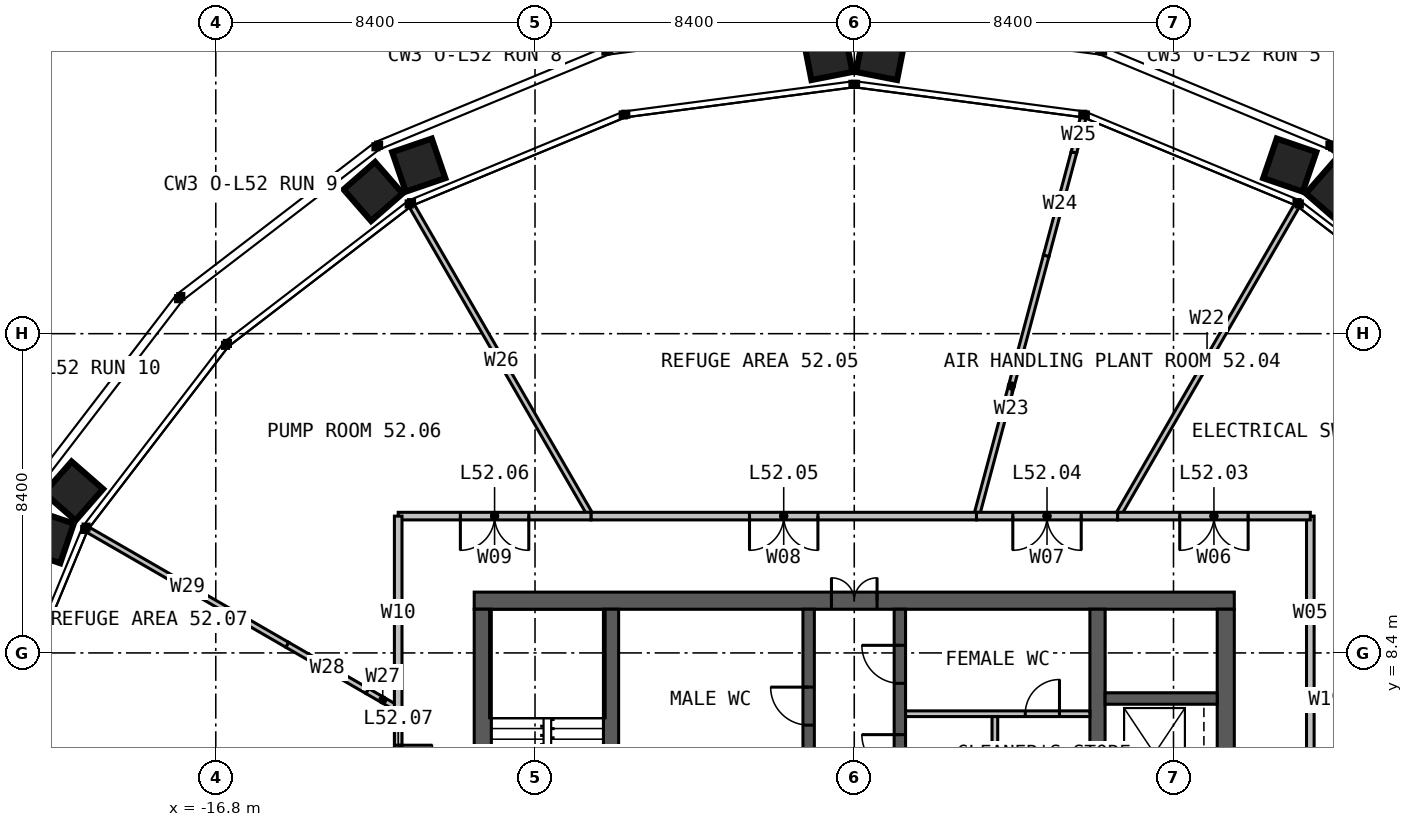
"""IFC4 building model, lengths in metres.
Left out: names, types, materials, properties, quantities, classifications, styles, units other than length and angle.
Written with IfcOpenShell. Run it as: python <this file> out.ifc"""

import sys

from ifc_helpers import new_model, si_unit, direction, frame, frame_2d, origin, place, context, subcontext, project, spatial, rectangle, extrude, element, fill, save


model = new_model("IFC4")
c1 = context("Model", 3, precision=1e-05, world=origin(), true_north=direction((0.0, 1.0)))
c2 = subcontext(c1, "Body", "Model", "MODEL_VIEW")
j1 = project(units=[si_unit("LENGTHUNIT", "METRE"), si_unit("PLANEANGLEUNIT", "RADIAN")], contexts=[c1])
p1 = place(None, origin())
s1 = spatial("IfcSite", under=j1, at=p1, CompositionType="ELEMENT")
p2 = place(p1, origin())
s2 = spatial("IfcBuilding", under=s1, at=p2, CompositionType="ELEMENT")
p3 = place(p2, frame((0.0, 0.0, 215.0)))
s3 = spatial("IfcBuildingStorey", under=s2, at=p3, CompositionType="ELEMENT", Elevation=215.0)
p4 = place(p3, frame((-10.0, 9.775, 0.0), z_axis=(0.0, 0.0, 1.0), x_axis=(1.0, 0.0, 0.0)))
e1 = element("IfcWall", 1, at=p4, inside=s3, PredefinedType="SOLIDWALL", context=c2, shape_type="SweptSolid", body=[
    extrude(rectangle(XDim=20.0, YDim=0.45, at=frame_2d((10.0, 0.0))), origin(), (0.0, 0.0, 1.0), 5.0),
])
p5 = place(p4, frame((9.4, 0.0, 0.0)))
e2 = element("IfcOpeningElement", 2, at=p5, cuts=e1, PredefinedType="OPENING", context=c2, shape_type="SweptSolid", body=[
    extrude(rectangle(XDim=1.2, YDim=2.2, at=frame_2d((0.6, 1.1))), frame((0.0, 0.235, 0.0), z_axis=(0.0, -1.0, 0.0), x_axis=(1.0, 0.0, 0.0)), (0.0, 0.0, 1.0), 0.47),
])
for number, where, z_axis, x_axis in (
    (3, (9.775, -9.55, 0.0), (0.0, 0.0, 1.0), (0.0, 1.0, 0.0)),
    (4, (-9.775, 9.55, 0.0), (0.0, 0.0, 1.0), (0.0, -1.0, 0.0)),
):
    element("IfcWall", number, at=place(p3, frame(where, z_axis=z_axis, x_axis=x_axis)), inside=s3, PredefinedType="SOLIDWALL", context=c2, shape_type="SweptSolid", body=[
        extrude(rectangle(XDim=19.1, YDim=0.45, at=frame_2d((9.55, 0.0))), origin(), (0.0, 0.0, 1.0), 5.0),
    ])
p6 = place(p3, frame((-6.4, -9.55, 0.0), z_axis=(0.0, 0.0, 1.0), x_axis=(0.0, 1.0, 0.0)))
e5 = element("IfcWall", 5, at=p6, inside=s3, PredefinedType="SOLIDWALL", context=c2, shape_type="SweptSolid", body=[
    extrude(rectangle(XDim=19.1, YDim=0.4, at=frame_2d((9.55, 0.0))), origin(), (0.0, 0.0, 1.0), 5.0),
])
p7 = place(p6, frame((9.05, 0.0, 0.0)))
e6 = element("IfcOpeningElement", 6, at=p7, cuts=e5, PredefinedType="OPENING", context=c2, shape_type="SweptSolid", body=[
    extrude(rectangle(XDim=1.0, YDim=2.2, at=frame_2d((0.5, 1.1))), frame((0.0, 0.21, 0.0), z_axis=(0.0, -1.0, 0.0), x_axis=(1.0, 0.0, 0.0)), (0.0, 0.0, 1.0), 0.42),
])
p8 = place(p3, frame((6.4, 9.55, 0.0), z_axis=(0.0, 0.0, 1.0), x_axis=(0.0, -1.0, 0.0)))
e7 = element("IfcWall", 7, at=p8, inside=s3, PredefinedType="SOLIDWALL", context=c2, shape_type="SweptSolid", body=[
    extrude(rectangle(XDim=19.1, YDim=0.4, at=frame_2d((9.55, 0.0))), origin(), (0.0, 0.0, 1.0), 5.0),
])
p9 = place(p8, frame((9.05, 0.0, 0.0)))
e8 = element("IfcOpeningElement", 8, at=p9, cuts=e7, PredefinedType="OPENING", context=c2, shape_type="SweptSolid", body=[
    extrude(rectangle(XDim=1.0, YDim=2.2, at=frame_2d((0.5, 1.1))), frame((0.0, 0.21, 0.0), z_axis=(0.0, -1.0, 0.0), x_axis=(1.0, 0.0, 0.0)), (0.0, 0.0, 1.0), 0.42),
])
p10 = place(p3, frame((-1.2, 1.45, 0.0), z_axis=(0.0, 0.0, 1.0), x_axis=(0.0, 1.0, 0.0)))
e9 = element("IfcWall", 9, at=p10, inside=s3, PredefinedType="SOLIDWALL", context=c2, shape_type="SweptSolid", body=[
    extrude(rectangle(XDim=8.1, YDim=0.3, at=frame_2d((4.05, 0.0))), origin(), (0.0, 0.0, 1.0), 5.0),
])
p11 = place(p10, frame((5.05, 0.0, 0.0)))
e10 = element("IfcOpeningElement", 10, at=p11, cuts=e9, PredefinedType="OPENING", context=c2, shape_type="SweptSolid", body=[
    extrude(rectangle(XDim=1.0, YDim=2.2, at=frame_2d((0.5, 1.1))), frame((0.0, 0.16, 0.0), z_axis=(0.0, -1.0, 0.0), x_axis=(1.0, 0.0, 0.0)), (0.0, 0.0, 1.0), 0.32),
])
p12 = place(p3, frame((1.2, 1.45, 0.0), z_axis=(0.0, 0.0, 1.0), x_axis=(0.0, 1.0, 0.0)))
e11 = element("IfcWall", 11, at=p12, inside=s3, PredefinedType="SOLIDWALL", context=c2, shape_type="SweptSolid", body=[
    extrude(rectangle(XDim=8.1, YDim=0.3, at=frame_2d((4.05, 0.0))), origin(), (0.0, 0.0, 1.0), 5.0),
])
p13 = place(p12, frame((3.8, 0.0, 0.0)))
e12 = element("IfcOpeningElement", 12, at=p13, cuts=e11, PredefinedType="OPENING", context=c2, shape_type="SweptSolid", body=[
    extrude(rectangle(XDim=1.0, YDim=2.2, at=frame_2d((0.5, 1.1))), frame((0.0, 0.16, 0.0), z_axis=(0.0, -1.0, 0.0), x_axis=(1.0, 0.0, 0.0)), (0.0, 0.0, 1.0), 0.32),
])
p14 = place(p12, frame((6.15, 0.0, 0.0)))
e13 = element("IfcOpeningElement", 13, at=p14, cuts=e11, PredefinedType="OPENING", context=c2, shape_type="SweptSolid", body=[
    extrude(rectangle(XDim=1.0, YDim=2.2, at=frame_2d((0.5, 1.1))), frame((0.0, 0.16, 0.0), z_axis=(0.0, -1.0, 0.0), x_axis=(1.0, 0.0, 0.0)), (0.0, 0.0, 1.0), 0.32),
])
p15 = place(p3, frame((6.6, 7.2, 0.0), z_axis=(0.0, 0.0, 1.0), x_axis=(1.0, 0.0, 0.0)))
e14 = element("IfcWall", 14, at=p15, inside=s3, PredefinedType="SOLIDWALL", context=c2, shape_type="SweptSolid", body=[
    extrude(rectangle(XDim=2.95, YDim=0.3, at=frame_2d((1.475, 0.0))), origin(), (0.0, 0.0, 1.0), 5.0),
])
p16 = place(p3, frame((1.35, 6.8, 0.0), z_axis=(0.0, 0.0, 1.0), x_axis=(1.0, 0.0, 0.0)))
e15 = element("IfcWall", 15, at=p16, inside=s3, PredefinedType="PARTITIONING", context=c2, shape_type="SweptSolid", body=[
    extrude(rectangle(XDim=4.85, YDim=0.15, at=frame_2d((2.425, 0.0))), origin(), (0.0, 0.0, 1.0), 4.75),
])
p17 = place(p16, frame((3.15, 0.0, 0.0)))
e16 = element("IfcOpeningElement", 16, at=p17, cuts=e15, PredefinedType="OPENING", context=c2, shape_type="SweptSolid", body=[
    extrude(rectangle(XDim=0.9, YDim=2.2, at=frame_2d((0.45, 1.1))), frame((0.0, 0.085, 0.0), z_axis=(0.0, -1.0, 0.0), x_axis=(1.0, 0.0, 0.0)), (0.0, 0.0, 1.0), 0.17),
])
p18 = place(p3, frame((3.7, 4.75, 0.0), z_axis=(0.0, 0.0, 1.0), x_axis=(0.0, 1.0, 0.0)))
e17 = element("IfcWall", 17, at=p18, inside=s3, PredefinedType="PARTITIONING", context=c2, shape_type="SweptSolid", body=[
    extrude(rectangle(XDim=1.975, YDim=0.15, at=frame_2d((0.988, 0.0))), origin(), (0.0, 0.0, 1.0), 4.75),
])
p19 = place(p3, frame((12.0, 6.928, 0.0), z_axis=(0.0, 0.0, 1.0), x_axis=(0.866042712228, 0.499970019698, 0.0)))
e18 = element("IfcWall", 18, at=p19, inside=s3, PredefinedType="PARTITIONING", context=c2, shape_type="SweptSolid", body=[
    extrude(rectangle(XDim=0.939, YDim=0.15, at=frame_2d((0.469, 0.0))), origin(), (0.0, 0.0, 1.0), 4.8),
])
p20 = place(p3, frame((6.928, 12.0, 0.0), z_axis=(0.0, 0.0, 1.0), x_axis=(0.500008934908, 0.866020245151, 0.0)))
e19 = element("IfcWall", 19, at=p20, inside=s3, PredefinedType="PARTITIONING", context=c2, shape_type="SweptSolid", body=[
    extrude(rectangle(XDim=9.418, YDim=0.15, at=frame_2d((4.709, 0.0))), origin(), (0.0, 0.0, 1.0), 4.8),
])
p21 = place(p3, frame((3.215, 12.0, 0.0), z_axis=(0.0, 0.0, 1.0), x_axis=(0.258845050614, 0.965918857758, 0.0)))
e20 = element("IfcWall", 20, at=p21, inside=s3, PredefinedType="PARTITIONING", context=c2, shape_type="SweptSolid", body=[
    extrude(rectangle(XDim=7.093, YDim=0.15, at=frame_2d((3.546, 0.0))), origin(), (0.0, 0.0, 1.0), 4.8),
])
p22 = place(p3, frame((5.051, 18.851, 0.0), z_axis=(0.0, 0.0, 1.0), x_axis=(0.258741864149, 0.965946503558, 0.0)))
e21 = element("IfcWall", 21, at=p22, inside=s3, PredefinedType="PARTITIONING", context=c2, shape_type="SweptSolid", body=[
    extrude(rectangle(XDim=2.816, YDim=0.15, at=frame_2d((1.408, 0.0))), origin(), (0.0, 0.0, 1.0), 3.79),
])
p23 = place(p3, frame((5.78, 21.571, 0.0), z_axis=(0.0, 0.0, 1.0), x_axis=(0.259016592134, 0.965872872069, 0.0)))
e22 = element("IfcWall", 22, at=p23, inside=s3, PredefinedType="PARTITIONING", context=c2, shape_type="SweptSolid", body=[
    extrude(rectangle(XDim=0.943, YDim=0.15, at=frame_2d((0.471, 0.0))), origin(), (0.0, 0.0, 1.0), 4.8),
])
p24 = place(p3, frame((-6.928, 12.0, 0.0), z_axis=(0.0, 0.0, 1.0), x_axis=(-0.500008934908, 0.866020245151, 0.0)))
e23 = element("IfcWall", 23, at=p24, inside=s3, PredefinedType="PARTITIONING", context=c2, shape_type="SweptSolid", body=[
    extrude(rectangle(XDim=9.418, YDim=0.15, at=frame_2d((4.709, 0.0))), origin(), (0.0, 0.0, 1.0), 4.8),
])
p25 = place(p3, frame((-12.0, 6.928, 0.0), z_axis=(0.0, 0.0, 1.0), x_axis=(-0.866042712228, 0.499970019698, 0.0)))
e24 = element("IfcWall", 24, at=p25, inside=s3, PredefinedType="PARTITIONING", context=c2, shape_type="SweptSolid", body=[
    extrude(rectangle(XDim=0.939, YDim=0.15, at=frame_2d((0.469, 0.0))), origin(), (0.0, 0.0, 1.0), 4.8),
])
p26 = place(p3, frame((-12.813, 7.398, 0.0), z_axis=(0.0, 0.0, 1.0), x_axis=(-0.86601855109, 0.500011869027, 0.0)))
e25 = element("IfcWall", 25, at=p26, inside=s3, PredefinedType="PARTITIONING", context=c2, shape_type="SweptSolid", body=[
    extrude(rectangle(XDim=2.434, YDim=0.15, at=frame_2d((1.217, 0.0))), origin(), (0.0, 0.0, 1.0), 3.79),
])
p27 = place(p3, frame((-14.921, 8.615, 0.0), z_axis=(0.0, 0.0, 1.0), x_axis=(-0.866017437, 0.500013798622, 0.0)))
e26 = element("IfcWall", 26, at=p27, inside=s3, PredefinedType="PARTITIONING", context=c2, shape_type="SweptSolid", body=[
    extrude(rectangle(XDim=6.045, YDim=0.15, at=frame_2d((3.022, 0.0))), origin(), (0.0, 0.0, 1.0), 4.8),
])
p28 = place(p3, frame((12.0, -3.215, 0.0), z_axis=(0.0, 0.0, 1.0), x_axis=(0.0, 1.0, 0.0)))
e27 = element("IfcWall", 27, at=p28, inside=s3, PredefinedType="PARTITIONING", context=c2, shape_type="SweptSolid", body=[
    extrude(rectangle(XDim=10.144, YDim=0.2, at=frame_2d((5.072, 0.0))), origin(), (0.0, 0.0, 1.0), 4.8),
])
p29 = place(p28, frame((4.172, 0.0, 0.0)))
e28 = element("IfcOpeningElement", 28, at=p29, cuts=e27, PredefinedType="OPENING", context=c2, shape_type="SweptSolid", body=[
    extrude(rectangle(XDim=1.8, YDim=2.2, at=frame_2d((0.9, 1.1))), frame((0.0, 0.11, 0.0), z_axis=(0.0, -1.0, 0.0), x_axis=(1.0, 0.0, 0.0)), (0.0, 0.0, 1.0), 0.22),
])
p30 = place(p3, frame((12.0, 6.928, 0.0), z_axis=(0.0, 0.0, 1.0), x_axis=(0.0, 1.0, 0.0)))
e29 = element("IfcWall", 29, at=p30, inside=s3, PredefinedType="PARTITIONING", context=c2, shape_type="SweptSolid", body=[
    extrude(rectangle(XDim=5.072, YDim=0.2, at=frame_2d((2.536, 0.0))), origin(), (0.0, 0.0, 1.0), 4.8),
])
p31 = place(p3, frame((12.0, 12.0, 0.0), z_axis=(0.0, 0.0, 1.0), x_axis=(-1.0, 0.0, 0.0)))
e30 = element("IfcWall", 30, at=p31, inside=s3, PredefinedType="PARTITIONING", context=c2, shape_type="SweptSolid", body=[
    extrude(rectangle(XDim=5.072, YDim=0.2, at=frame_2d((2.536, 0.0))), origin(), (0.0, 0.0, 1.0), 4.8),
])
p32 = place(p31, frame((1.636, 0.0, 0.0)))
e31 = element("IfcOpeningElement", 31, at=p32, cuts=e30, PredefinedType="OPENING", context=c2, shape_type="SweptSolid", body=[
    extrude(rectangle(XDim=1.8, YDim=2.2, at=frame_2d((0.9, 1.1))), frame((0.0, 0.11, 0.0), z_axis=(0.0, -1.0, 0.0), x_axis=(1.0, 0.0, 0.0)), (0.0, 0.0, 1.0), 0.22),
])
p33 = place(p3, frame((6.928, 12.0, 0.0), z_axis=(0.0, 0.0, 1.0), x_axis=(-1.0, 0.0, 0.0)))
e32 = element("IfcWall", 32, at=p33, inside=s3, PredefinedType="PARTITIONING", context=c2, shape_type="SweptSolid", body=[
    extrude(rectangle(XDim=3.713, YDim=0.2, at=frame_2d((1.856, 0.0))), origin(), (0.0, 0.0, 1.0), 4.8),
])
p34 = place(p33, frame((0.956, 0.0, 0.0)))
e33 = element("IfcOpeningElement", 33, at=p34, cuts=e32, PredefinedType="OPENING", context=c2, shape_type="SweptSolid", body=[
    extrude(rectangle(XDim=1.8, YDim=2.2, at=frame_2d((0.9, 1.1))), frame((0.0, 0.11, 0.0), z_axis=(0.0, -1.0, 0.0), x_axis=(1.0, 0.0, 0.0)), (0.0, 0.0, 1.0), 0.22),
])
p35 = place(p3, frame((3.215, 12.0, 0.0), z_axis=(0.0, 0.0, 1.0), x_axis=(-1.0, 0.0, 0.0)))
e34 = element("IfcWall", 34, at=p35, inside=s3, PredefinedType="PARTITIONING", context=c2, shape_type="SweptSolid", body=[
    extrude(rectangle(XDim=10.144, YDim=0.2, at=frame_2d((5.072, 0.0))), origin(), (0.0, 0.0, 1.0), 4.8),
])
p36 = place(p35, frame((4.172, 0.0, 0.0)))
e35 = element("IfcOpeningElement", 35, at=p36, cuts=e34, PredefinedType="OPENING", context=c2, shape_type="SweptSolid", body=[
    extrude(rectangle(XDim=1.8, YDim=2.2, at=frame_2d((0.9, 1.1))), frame((0.0, 0.11, 0.0), z_axis=(0.0, -1.0, 0.0), x_axis=(1.0, 0.0, 0.0)), (0.0, 0.0, 1.0), 0.22),
])
p37 = place(p3, frame((-6.928, 12.0, 0.0), z_axis=(0.0, 0.0, 1.0), x_axis=(-1.0, 0.0, 0.0)))
e36 = element("IfcWall", 36, at=p37, inside=s3, PredefinedType="PARTITIONING", context=c2, shape_type="SweptSolid", body=[
    extrude(rectangle(XDim=5.072, YDim=0.2, at=frame_2d((2.536, 0.0))), origin(), (0.0, 0.0, 1.0), 4.8),
])
p38 = place(p37, frame((1.636, 0.0, 0.0)))
e37 = element("IfcOpeningElement", 37, at=p38, cuts=e36, PredefinedType="OPENING", context=c2, shape_type="SweptSolid", body=[
    extrude(rectangle(XDim=1.8, YDim=2.2, at=frame_2d((0.9, 1.1))), frame((0.0, 0.11, 0.0), z_axis=(0.0, -1.0, 0.0), x_axis=(1.0, 0.0, 0.0)), (0.0, 0.0, 1.0), 0.22),
])
p39 = place(p3, frame((-12.0, 12.0, 0.0), z_axis=(0.0, 0.0, 1.0), x_axis=(0.0, -1.0, 0.0)))
e38 = element("IfcWall", 38, at=p39, inside=s3, PredefinedType="PARTITIONING", context=c2, shape_type="SweptSolid", body=[
    extrude(rectangle(XDim=5.072, YDim=0.2, at=frame_2d((2.536, 0.0))), origin(), (0.0, 0.0, 1.0), 4.8),
])
p40 = place(p3, frame((-12.0, 6.928, 0.0), z_axis=(0.0, 0.0, 1.0), x_axis=(0.0, -1.0, 0.0)))
e39 = element("IfcWall", 39, at=p40, inside=s3, PredefinedType="PARTITIONING", context=c2, shape_type="SweptSolid", body=[
    extrude(rectangle(XDim=3.713, YDim=0.2, at=frame_2d((1.856, 0.0))), origin(), (0.0, 0.0, 1.0), 4.8),
])
p41 = place(p40, frame((0.956, 0.0, 0.0)))
e40 = element("IfcOpeningElement", 40, at=p41, cuts=e39, PredefinedType="OPENING", context=c2, shape_type="SweptSolid", body=[
    extrude(rectangle(XDim=1.8, YDim=2.2, at=frame_2d((0.9, 1.1))), frame((0.0, 0.11, 0.0), z_axis=(0.0, -1.0, 0.0), x_axis=(1.0, 0.0, 0.0)), (0.0, 0.0, 1.0), 0.22),
])
p42 = place(p5, origin())
e41 = element("IfcDoor", 41, at=p42, inside=s3, OperationType="DOUBLE_DOOR_SINGLE_SWING", PredefinedType="DOOR", context=c2, shape_type="SweptSolid", body=[
    extrude(rectangle(XDim=1.2, YDim=2.2, at=frame_2d((0.6, 1.1))), frame((0.0, 0.025, 0.0), z_axis=(0.0, -1.0, 0.0), x_axis=(1.0, 0.0, 0.0)), (0.0, 0.0, 1.0), 0.05),
])
fill(e2, e41)
p43 = place(p11, origin())
e42 = element("IfcDoor", 42, at=p43, inside=s3, OperationType="SINGLE_SWING_RIGHT", PredefinedType="DOOR", context=c2, shape_type="SweptSolid", body=[
    extrude(rectangle(XDim=1.0, YDim=2.2, at=frame_2d((0.5, 1.1))), frame((0.0, 0.025, 0.0), z_axis=(0.0, -1.0, 0.0), x_axis=(1.0, 0.0, 0.0)), (0.0, 0.0, 1.0), 0.05),
])
fill(e10, e42)
p44 = place(p13, origin())
e43 = element("IfcDoor", 43, at=p44, inside=s3, OperationType="SINGLE_SWING_RIGHT", PredefinedType="DOOR", context=c2, shape_type="SweptSolid", body=[
    extrude(rectangle(XDim=1.0, YDim=2.2, at=frame_2d((0.5, 1.1))), frame((0.0, 0.025, 0.0), z_axis=(0.0, -1.0, 0.0), x_axis=(1.0, 0.0, 0.0)), (0.0, 0.0, 1.0), 0.05),
])
fill(e12, e43)
p45 = place(p14, origin())
e44 = element("IfcDoor", 44, at=p45, inside=s3, OperationType="SINGLE_SWING_RIGHT", PredefinedType="DOOR", context=c2, shape_type="SweptSolid", body=[
    extrude(rectangle(XDim=1.0, YDim=2.2, at=frame_2d((0.5, 1.1))), frame((0.0, 0.025, 0.0), z_axis=(0.0, -1.0, 0.0), x_axis=(1.0, 0.0, 0.0)), (0.0, 0.0, 1.0), 0.05),
])
fill(e13, e44)
p46 = place(p17, origin())
e45 = element("IfcDoor", 45, at=p46, inside=s3, OperationType="SINGLE_SWING_RIGHT", PredefinedType="DOOR", context=c2, shape_type="SweptSolid", body=[
    extrude(rectangle(XDim=0.9, YDim=2.2, at=frame_2d((0.45, 1.1))), frame((0.0, 0.025, 0.0), z_axis=(0.0, -1.0, 0.0), x_axis=(1.0, 0.0, 0.0)), (0.0, 0.0, 1.0), 0.05),
])
fill(e16, e45)
p47 = place(p32, origin())
e46 = element("IfcDoor", 46, at=p47, inside=s3, OperationType="DOUBLE_DOOR_SINGLE_SWING", PredefinedType="DOOR", context=c2, shape_type="SweptSolid", body=[
    extrude(rectangle(XDim=1.8, YDim=2.2, at=frame_2d((0.9, 1.1))), frame((0.0, 0.025, 0.0), z_axis=(0.0, -1.0, 0.0), x_axis=(1.0, 0.0, 0.0)), (0.0, 0.0, 1.0), 0.05),
])
fill(e31, e46)
p48 = place(p34, origin())
e47 = element("IfcDoor", 47, at=p48, inside=s3, OperationType="DOUBLE_DOOR_SINGLE_SWING", PredefinedType="DOOR", context=c2, shape_type="SweptSolid", body=[
    extrude(rectangle(XDim=1.8, YDim=2.2, at=frame_2d((0.9, 1.1))), frame((0.0, 0.025, 0.0), z_axis=(0.0, -1.0, 0.0), x_axis=(1.0, 0.0, 0.0)), (0.0, 0.0, 1.0), 0.05),
])
fill(e33, e47)
p49 = place(p36, origin())
e48 = element("IfcDoor", 48, at=p49, inside=s3, OperationType="DOUBLE_DOOR_SINGLE_SWING", PredefinedType="DOOR", context=c2, shape_type="SweptSolid", body=[
    extrude(rectangle(XDim=1.8, YDim=2.2, at=frame_2d((0.9, 1.1))), frame((0.0, 0.025, 0.0), z_axis=(0.0, -1.0, 0.0), x_axis=(1.0, 0.0, 0.0)), (0.0, 0.0, 1.0), 0.05),
])
fill(e35, e48)
p50 = place(p38, origin())
e49 = element("IfcDoor", 49, at=p50, inside=s3, OperationType="DOUBLE_DOOR_SINGLE_SWING", PredefinedType="DOOR", context=c2, shape_type="SweptSolid", body=[
    extrude(rectangle(XDim=1.8, YDim=2.2, at=frame_2d((0.9, 1.1))), frame((0.0, 0.025, 0.0), z_axis=(0.0, -1.0, 0.0), x_axis=(1.0, 0.0, 0.0)), (0.0, 0.0, 1.0), 0.05),
])
fill(e37, e49)
p51 = place(p41, origin())
e50 = element("IfcDoor", 50, at=p51, inside=s3, OperationType="DOUBLE_DOOR_SINGLE_SWING", PredefinedType="DOOR", context=c2, shape_type="SweptSolid", body=[
    extrude(rectangle(XDim=1.8, YDim=2.2, at=frame_2d((0.9, 1.1))), frame((0.0, 0.025, 0.0), z_axis=(0.0, -1.0, 0.0), x_axis=(1.0, 0.0, 0.0)), (0.0, 0.0, 1.0), 0.05),
])
fill(e40, e50)
save(model, sys.argv[1])
